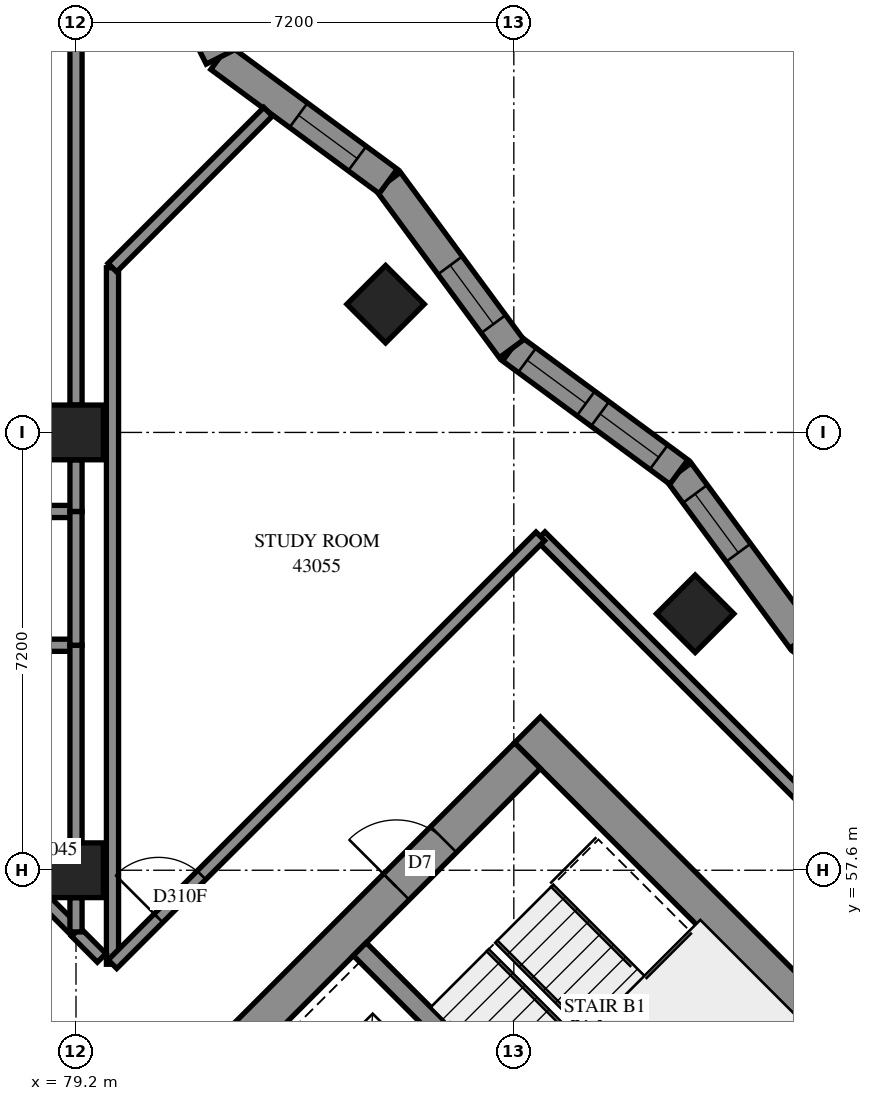
"""IFC4 building model, lengths in metres.
Left out: names, types, materials, properties, quantities, classifications, styles, units other than length and angle.
Written with IfcOpenShell. Run it as: python <this file> out.ifc"""

import sys

from ifc_helpers import new_model, si_unit, direction, frame, frame_2d, origin, origin_2d, place, context, subcontext, project, spatial, polyline, rectangle, outline, extrude, element, fill, save


model = new_model("IFC4")
c1 = context("Model", 3, precision=1e-05, world=origin(), true_north=direction((0.0, 1.0)))
c2 = subcontext(c1, "Body", "Model", "MODEL_VIEW")
j1 = project(units=[si_unit("LENGTHUNIT", "METRE"), si_unit("PLANEANGLEUNIT", "RADIAN")], contexts=[c1])
p1 = place(None, origin())
s1 = spatial("IfcSite", under=j1, at=p1, CompositionType="ELEMENT")
p2 = place(p1, origin())
s2 = spatial("IfcBuilding", under=s1, at=p2, CompositionType="ELEMENT")
p3 = place(p2, frame((0.0, 0.0, 159.2)))
s3 = spatial("IfcBuildingStorey", under=s2, at=p3, CompositionType="ELEMENT", Elevation=159.2)
for number, where, z_axis, x_axis in (
    (1, (79.2, 57.6, 0.0), (0.0, 0.0, 1.0), (1.0, 0.0, 0.0)),
    (2, (79.2, 64.8, 0.0), (0.0, 0.0, 1.0), (1.0, 0.0, 0.0)),
    (3, (84.291, 66.909, 0.0), (0.0, 0.0, 1.0), (0.707, -0.707, 0.0)),
    (4, (89.382, 61.818, 0.0), (0.0, 0.0, 1.0), (0.707, -0.707, 0.0)),
):
    element("IfcColumn", number, at=place(p3, frame(where, z_axis=z_axis, x_axis=x_axis)), inside=s3, PredefinedType="COLUMN", context=c2, shape_type="SweptSolid", body=[
        extrude(rectangle(XDim=0.9, YDim=0.9, at=origin_2d()), origin(), (0.0, 0.0, 1.0), 3.1),
    ])
p4 = place(p3, frame((86.625, 59.908, -0.3), z_axis=(0.0, 0.0, 1.0), x_axis=(0.7071067812, -0.7071067812, 0.0)))
e5 = element("IfcWall", 5, at=p4, inside=s3, PredefinedType="SHEAR", context=c2, shape_type="SweptSolid", body=[
    extrude(rectangle(XDim=15.6, YDim=0.6, at=frame_2d((7.8, 0.0))), origin(), (0.0, 0.0, 1.0), 2.7),
])
p5 = place(p4, frame((10.6, 0.0, 0.3)))
e6 = element("IfcOpeningElement", 6, at=p5, cuts=e5, PredefinedType="OPENING", context=c2, shape_type="SweptSolid", body=[
    extrude(rectangle(XDim=0.8, YDim=2.1, at=frame_2d((0.4, 1.05))), frame((0.0, 0.31, 0.0), z_axis=(0.0, -1.0, 0.0), x_axis=(1.0, 0.0, 0.0)), (0.0, 0.0, 1.0), 0.62),
])
p6 = place(p3, frame((76.442, 49.302, -0.3), z_axis=(0.0, 0.0, 1.0), x_axis=(0.7071067812, 0.7071067812, 0.0)))
e7 = element("IfcWall", 7, at=p6, inside=s3, PredefinedType="SHEAR", context=c2, shape_type="SweptSolid", body=[
    extrude(rectangle(XDim=14.4, YDim=0.6, at=frame_2d((7.2, 0.0))), origin(), (0.0, 0.0, 1.0), 2.7),
])
p7 = place(p6, frame((4.55, 0.0, 0.3)))
e8 = element("IfcOpeningElement", 8, at=p7, cuts=e7, PredefinedType="OPENING", context=c2, shape_type="SweptSolid", body=[
    extrude(rectangle(XDim=1.1, YDim=2.1, at=frame_2d((0.55, 1.05))), frame((0.0, 0.31, 0.0), z_axis=(0.0, -1.0, 0.0), x_axis=(1.0, 0.0, 0.0)), (0.0, 0.0, 1.0), 0.62),
])
p8 = place(p6, frame((11.35, 0.0, 0.3)))
e9 = element("IfcOpeningElement", 9, at=p8, cuts=e7, PredefinedType="OPENING", context=c2, shape_type="SweptSolid", body=[
    extrude(rectangle(XDim=1.1, YDim=2.1, at=frame_2d((0.55, 1.05))), frame((0.0, 0.31, 0.0), z_axis=(0.0, -1.0, 0.0), x_axis=(1.0, 0.0, 0.0)), (0.0, 0.0, 1.0), 0.62),
])
p9 = place(p3, frame((83.867, 56.302, 0.0), z_axis=(0.0, 0.0, 1.0), x_axis=(0.7071137256, -0.7070998367, 0.0)))
e10 = element("IfcWall", 10, at=p9, inside=s3, PredefinedType="SOLIDWALL", context=c2, shape_type="SweptSolid", body=[
    extrude(rectangle(XDim=7.2, YDim=0.3, at=frame_2d((3.6, 0.0))), origin(), (0.0, 0.0, 1.0), 3.1),
])
p10 = place(p3, frame((93.894, 59.37, 0.0), z_axis=(0.0, 0.0, 1.0), x_axis=(-0.8050403966, 0.5932199928, 0.0)))
e11 = element("IfcWall", 11, at=p10, inside=s3, PredefinedType="SOLIDWALL", context=c2, shape_type="SweptSolid", body=[
    extrude(outline(polyline([(-0.038, -0.25), (3.381, -0.25), (3.456, 0.25), (0.038, 0.25), (-0.038, -0.25)])), origin(), (0.0, 0.0, 1.0), 3.1),
])
p11 = place(p10, frame((1.677, 0.0, 0.45)))
e12 = element("IfcOpeningElement", 12, at=p11, cuts=e11, PredefinedType="OPENING", context=c2, shape_type="SweptSolid", body=[
    extrude(rectangle(XDim=1.2, YDim=2.5, at=frame_2d((0.6, 1.25))), frame((0.0, 0.26, 0.0), z_axis=(0.0, -1.0, 0.0), x_axis=(1.0, 0.0, 0.0)), (0.0, 0.0, 1.0), 0.52),
])
p12 = place(p3, frame((91.142, 61.398, 0.0), z_axis=(0.0, 0.0, 1.0), x_axis=(-0.5932150043, 0.8050440725, 0.0)))
e13 = element("IfcWall", 13, at=p12, inside=s3, PredefinedType="SOLIDWALL", context=c2, shape_type="SweptSolid", body=[
    extrude(outline(polyline([(0.038, -0.25), (3.456, -0.25), (3.381, 0.25), (-0.038, 0.25), (0.038, -0.25)])), origin(), (0.0, 0.0, 1.0), 3.1),
])
p13 = place(p12, frame((1.77, 0.0, 0.45)))
e14 = element("IfcOpeningElement", 14, at=p13, cuts=e13, PredefinedType="OPENING", context=c2, shape_type="SweptSolid", body=[
    extrude(rectangle(XDim=1.2, YDim=2.5, at=frame_2d((0.6, 1.25))), frame((0.0, 0.26, 0.0), z_axis=(0.0, -1.0, 0.0), x_axis=(1.0, 0.0, 0.0)), (0.0, 0.0, 1.0), 0.52),
])
p14 = place(p3, frame((89.114, 64.149, 0.0), z_axis=(0.0, 0.0, 1.0), x_axis=(-0.8050301018, 0.5932339633, 0.0)))
e15 = element("IfcWall", 15, at=p14, inside=s3, PredefinedType="SOLIDWALL", context=c2, shape_type="SweptSolid", body=[
    extrude(outline(polyline([(-0.038, -0.25), (3.381, -0.25), (3.456, 0.25), (0.038, 0.25), (-0.038, -0.25)])), origin(), (0.0, 0.0, 1.0), 3.1),
])
p15 = place(p14, frame((0.41, 0.0, 0.45)))
e16 = element("IfcOpeningElement", 16, at=p15, cuts=e15, PredefinedType="OPENING", context=c2, shape_type="SweptSolid", body=[
    extrude(rectangle(XDim=1.2, YDim=2.5, at=frame_2d((0.6, 1.25))), frame((0.0, 0.26, 0.0), z_axis=(0.0, -1.0, 0.0), x_axis=(1.0, 0.0, 0.0)), (0.0, 0.0, 1.0), 0.52),
])
p16 = place(p14, frame((1.9, 0.0, 0.45)))
e17 = element("IfcOpeningElement", 17, at=p16, cuts=e15, PredefinedType="OPENING", context=c2, shape_type="SweptSolid", body=[
    extrude(rectangle(XDim=1.2, YDim=2.5, at=frame_2d((0.6, 1.25))), frame((0.0, 0.26, 0.0), z_axis=(0.0, -1.0, 0.0), x_axis=(1.0, 0.0, 0.0)), (0.0, 0.0, 1.0), 0.52),
])
p17 = place(p3, frame((86.362, 66.177, 0.0), z_axis=(0.0, 0.0, 1.0), x_axis=(-0.5932339633, 0.8050301018, 0.0)))
e18 = element("IfcWall", 18, at=p17, inside=s3, PredefinedType="SOLIDWALL", context=c2, shape_type="SweptSolid", body=[
    extrude(outline(polyline([(0.038, -0.25), (3.456, -0.25), (3.381, 0.25), (-0.038, 0.25), (0.038, -0.25)])), origin(), (0.0, 0.0, 1.0), 3.1),
])
p18 = place(p17, frame((0.502, 0.0, 0.45)))
e19 = element("IfcOpeningElement", 19, at=p18, cuts=e18, PredefinedType="OPENING", context=c2, shape_type="SweptSolid", body=[
    extrude(rectangle(XDim=1.2, YDim=2.5, at=frame_2d((0.6, 1.25))), frame((0.0, 0.26, 0.0), z_axis=(0.0, -1.0, 0.0), x_axis=(1.0, 0.0, 0.0)), (0.0, 0.0, 1.0), 0.52),
])
p19 = place(p3, frame((84.334, 68.929, 0.0), z_axis=(0.0, 0.0, 1.0), x_axis=(-0.8050434162, 0.5932158949, 0.0)))
e20 = element("IfcWall", 20, at=p19, inside=s3, PredefinedType="SOLIDWALL", context=c2, shape_type="SweptSolid", body=[
    extrude(outline(polyline([(-0.038, -0.25), (3.381, -0.25), (3.5, 0.25), (0.038, 0.25), (-0.038, -0.25)])), origin(), (0.0, 0.0, 1.0), 3.1),
])
p20 = place(p19, frame((0.632, 0.0, 0.45)))
e21 = element("IfcOpeningElement", 21, at=p20, cuts=e20, PredefinedType="OPENING", context=c2, shape_type="SweptSolid", body=[
    extrude(rectangle(XDim=1.2, YDim=2.5, at=frame_2d((0.6, 1.25))), frame((0.0, 0.26, 0.0), z_axis=(0.0, -1.0, 0.0), x_axis=(1.0, 0.0, 0.0)), (0.0, 0.0, 1.0), 0.52),
])
p21 = place(p3, frame((81.565, 70.97, 0.0), z_axis=(0.0, 0.0, 1.0), x_axis=(-0.4506826549, 0.8926842357, 0.0)))
e22 = element("IfcWall", 22, at=p21, inside=s3, PredefinedType="SOLIDWALL", context=c2, shape_type="SweptSolid", body=[
    extrude(outline(polyline([(0.06, -0.25), (3.618, -0.25), (3.202, 0.25), (-0.06, 0.25), (0.06, -0.25)])), origin(), (0.0, 0.0, 1.0), 3.1),
])
p22 = place(p21, frame((0.764, 0.0, 0.45)))
e23 = element("IfcOpeningElement", 23, at=p22, cuts=e22, PredefinedType="OPENING", context=c2, shape_type="SweptSolid", body=[
    extrude(rectangle(XDim=1.2, YDim=2.5, at=frame_2d((0.6, 1.25))), frame((0.0, 0.26, 0.0), z_axis=(0.0, -1.0, 0.0), x_axis=(1.0, 0.0, 0.0)), (0.0, 0.0, 1.0), 0.52),
])
p23 = place(p3, frame((86.841, 63.093, 0.0), z_axis=(0.0, 0.0, 1.0), x_axis=(0.7071067812, -0.7071067812, 0.0)))
e24 = element("IfcWall", 24, at=p23, inside=s3, PredefinedType="PARTITIONING", context=c2, shape_type="SweptSolid", body=[
    extrude(rectangle(XDim=12.239, YDim=0.2, at=frame_2d((6.119, 0.0))), origin(), (0.0, 0.0, 1.0), 3.1),
])
p24 = place(p23, frame((10.634, 0.0, 0.0)))
e25 = element("IfcOpeningElement", 25, at=p24, cuts=e24, PredefinedType="OPENING", context=c2, shape_type="SweptSolid", body=[
    extrude(rectangle(XDim=0.9, YDim=2.1, at=frame_2d((0.45, 1.05))), frame((0.0, 0.11, 0.0), z_axis=(0.0, -1.0, 0.0), x_axis=(1.0, 0.0, 0.0)), (0.0, 0.0, 1.0), 0.22),
])
p25 = place(p3, frame((79.8, 56.054, 0.0), z_axis=(0.0, 0.0, 1.0), x_axis=(0.0, 1.0, 0.0)))
e26 = element("IfcWall", 26, at=p25, inside=s3, PredefinedType="PARTITIONING", context=c2, shape_type="SweptSolid", body=[
    extrude(rectangle(XDim=11.454, YDim=0.2, at=frame_2d((5.727, 0.0))), origin(), (0.0, 0.0, 1.0), 3.1),
])
p26 = place(p3, frame((79.799, 56.055, 0.0), z_axis=(0.0, 0.0, 1.0), x_axis=(0.7071067812, 0.7071067812, 0.0)))
e27 = element("IfcWall", 27, at=p26, inside=s3, PredefinedType="PARTITIONING", context=c2, shape_type="SweptSolid", body=[
    extrude(rectangle(XDim=9.95, YDim=0.2, at=frame_2d((4.975, 0.0))), origin(), (0.0, 0.0, 1.0), 3.1),
])
p27 = place(p26, frame((1.071, 0.0, 0.0)))
e28 = element("IfcOpeningElement", 28, at=p27, cuts=e27, PredefinedType="OPENING", context=c2, shape_type="SweptSolid", body=[
    extrude(rectangle(XDim=1.0, YDim=2.1, at=frame_2d((0.5, 1.05))), frame((0.0, 0.11, 0.0), z_axis=(0.0, -1.0, 0.0), x_axis=(1.0, 0.0, 0.0)), (0.0, 0.0, 1.0), 0.22),
])
p28 = place(p3, frame((79.2, 65.25, 0.0), z_axis=(0.0, 0.0, 1.0), x_axis=(0.0, 1.0, 0.0)))
e29 = element("IfcWall", 29, at=p28, inside=s3, PredefinedType="PARTITIONING", context=c2, shape_type="SweptSolid", body=[
    extrude(rectangle(XDim=6.3, YDim=0.2, at=frame_2d((3.15, 0.0))), origin(), (0.0, 0.0, 1.0), 3.1),
])
p29 = place(p3, frame((74.903, 60.889, 0.0), z_axis=(0.0, 0.0, 1.0), x_axis=(0.7071067812, -0.7071067812, 0.0)))
e30 = element("IfcWall", 30, at=p29, inside=s3, PredefinedType="PARTITIONING", context=c2, shape_type="SweptSolid", body=[
    extrude(rectangle(XDim=6.081, YDim=0.2, at=frame_2d((3.041, 0.0))), origin(), (0.0, 0.0, 1.0), 3.1),
])
p30 = place(p3, frame((74.488, 61.3, 0.0), z_axis=(0.0, 0.0, 1.0), x_axis=(1.0, 0.0, 0.0)))
e31 = element("IfcWall", 31, at=p30, inside=s3, PredefinedType="PARTITIONING", context=c2, shape_type="SweptSolid", body=[
    extrude(rectangle(XDim=4.712, YDim=0.2, at=frame_2d((2.356, 0.0))), origin(), (0.0, 0.0, 1.0), 3.1),
])
p31 = place(p30, frame((1.037, 0.0, 0.0)))
e32 = element("IfcOpeningElement", 32, at=p31, cuts=e31, PredefinedType="OPENING", context=c2, shape_type="SweptSolid", body=[
    extrude(rectangle(XDim=1.0, YDim=2.1, at=frame_2d((0.5, 1.05))), frame((0.0, 0.11, 0.0), z_axis=(0.0, -1.0, 0.0), x_axis=(1.0, 0.0, 0.0)), (0.0, 0.0, 1.0), 0.22),
])
p32 = place(p3, frame((74.702, 63.5, 0.0), z_axis=(0.0, 0.0, 1.0), x_axis=(1.0, 0.0, 0.0)))
e33 = element("IfcWall", 33, at=p32, inside=s3, PredefinedType="PARTITIONING", context=c2, shape_type="SweptSolid", body=[
    extrude(rectangle(XDim=4.498, YDim=0.2, at=frame_2d((2.249, 0.0))), origin(), (0.0, 0.0, 1.0), 3.1),
])
p33 = place(p32, frame((3.046, 0.0, 0.0)))
e34 = element("IfcOpeningElement", 34, at=p33, cuts=e33, PredefinedType="OPENING", context=c2, shape_type="SweptSolid", body=[
    extrude(rectangle(XDim=0.9, YDim=2.1, at=frame_2d((0.45, 1.05))), frame((0.0, 0.11, 0.0), z_axis=(0.0, -1.0, 0.0), x_axis=(1.0, 0.0, 0.0)), (0.0, 0.0, 1.0), 0.22),
])
p34 = place(p3, frame((79.798, 67.51, 0.0), z_axis=(0.0, 0.0, 1.0), x_axis=(0.7068308048, 0.7073826499, 0.0)))
e35 = element("IfcWall", 35, at=p34, inside=s3, PredefinedType="PARTITIONING", context=c2, shape_type="SweptSolid", body=[
    extrude(rectangle(XDim=3.624, YDim=0.2, at=frame_2d((1.812, 0.0))), origin(), (0.0, 0.0, 1.0), 3.1),
])
p35 = place(p3, frame((79.2, 58.05, 0.0), z_axis=(0.0, 0.0, 1.0), x_axis=(0.0, 1.0, 0.0)))
e36 = element("IfcWall", 36, at=p35, inside=s3, PredefinedType="PARTITIONING", context=c2, shape_type="SweptSolid", body=[
    extrude(rectangle(XDim=3.25, YDim=0.2, at=frame_2d((1.625, 0.0))), origin(), (0.0, 0.0, 1.0), 3.1),
])
p36 = place(p3, frame((79.2, 61.3, 0.0), z_axis=(0.0, 0.0, 1.0), x_axis=(0.0, 1.0, 0.0)))
e37 = element("IfcWall", 37, at=p36, inside=s3, PredefinedType="PARTITIONING", context=c2, shape_type="SweptSolid", body=[
    extrude(rectangle(XDim=2.2, YDim=0.2, at=frame_2d((1.1, 0.0))), origin(), (0.0, 0.0, 1.0), 3.1),
])
p37 = place(p3, frame((79.2, 63.5, 0.0), z_axis=(0.0, 0.0, 1.0), x_axis=(0.0, 1.0, 0.0)))
e38 = element("IfcWall", 38, at=p37, inside=s3, PredefinedType="PARTITIONING", context=c2, shape_type="SweptSolid", body=[
    extrude(rectangle(XDim=0.85, YDim=0.2, at=frame_2d((0.425, 0.0))), origin(), (0.0, 0.0, 1.0), 3.1),
])
p38 = place(p3, frame((79.198, 56.584, 0.0), z_axis=(0.0, 0.0, 1.0), x_axis=(0.7054410477, -0.7087685999, 0.0)))
e39 = element("IfcWall", 39, at=p38, inside=s3, PredefinedType="PARTITIONING", context=c2, shape_type="SweptSolid", body=[
    extrude(rectangle(XDim=0.601, YDim=0.2, at=frame_2d((0.3, 0.0))), origin(), (0.0, 0.0, 1.0), 3.1),
])
p39 = place(p3, frame((79.2, 56.586, 0.0), z_axis=(0.0, 0.0, 1.0), x_axis=(0.0, 1.0, 0.0)))
e40 = element("IfcWall", 40, at=p39, inside=s3, PredefinedType="PARTITIONING", context=c2, shape_type="SweptSolid", body=[
    extrude(rectangle(XDim=0.564, YDim=0.2, at=frame_2d((0.282, 0.0))), origin(), (0.0, 0.0, 1.0), 3.1),
])
p40 = place(p13, origin())
e41 = element("IfcWindow", 41, at=p40, inside=s3, PartitioningType="SINGLE_PANEL", PredefinedType="WINDOW", context=c2, shape_type="SweptSolid", body=[
    extrude(rectangle(XDim=1.2, YDim=2.5, at=frame_2d((0.6, 1.25))), frame((0.0, 0.18, 0.0), z_axis=(0.0, -1.0, 0.0), x_axis=(1.0, 0.0, 0.0)), (0.0, 0.0, 1.0), 0.06),
])
fill(e14, e41)
p41 = place(p15, origin())
e42 = element("IfcWindow", 42, at=p41, inside=s3, PartitioningType="SINGLE_PANEL", PredefinedType="WINDOW", context=c2, shape_type="SweptSolid", body=[
    extrude(rectangle(XDim=1.2, YDim=2.5, at=frame_2d((0.6, 1.25))), frame((0.0, 0.18, 0.0), z_axis=(0.0, -1.0, 0.0), x_axis=(1.0, 0.0, 0.0)), (0.0, 0.0, 1.0), 0.06),
])
fill(e16, e42)
p42 = place(p16, origin())
e43 = element("IfcWindow", 43, at=p42, inside=s3, PartitioningType="SINGLE_PANEL", PredefinedType="WINDOW", context=c2, shape_type="SweptSolid", body=[
    extrude(rectangle(XDim=1.2, YDim=2.5, at=frame_2d((0.6, 1.25))), frame((0.0, 0.18, 0.0), z_axis=(0.0, -1.0, 0.0), x_axis=(1.0, 0.0, 0.0)), (0.0, 0.0, 1.0), 0.06),
])
fill(e17, e43)
p43 = place(p18, origin())
e44 = element("IfcWindow", 44, at=p43, inside=s3, PartitioningType="SINGLE_PANEL", PredefinedType="WINDOW", context=c2, shape_type="SweptSolid", body=[
    extrude(rectangle(XDim=1.2, YDim=2.5, at=frame_2d((0.6, 1.25))), frame((0.0, 0.18, 0.0), z_axis=(0.0, -1.0, 0.0), x_axis=(1.0, 0.0, 0.0)), (0.0, 0.0, 1.0), 0.06),
])
fill(e19, e44)
p44 = place(p20, origin())
e45 = element("IfcWindow", 45, at=p44, inside=s3, PartitioningType="SINGLE_PANEL", PredefinedType="WINDOW", context=c2, shape_type="SweptSolid", body=[
    extrude(rectangle(XDim=1.2, YDim=2.5, at=frame_2d((0.6, 1.25))), frame((0.0, 0.18, 0.0), z_axis=(0.0, -1.0, 0.0), x_axis=(1.0, 0.0, 0.0)), (0.0, 0.0, 1.0), 0.06),
])
fill(e21, e45)
p45 = place(p8, origin())
e46 = element("IfcDoor", 46, at=p45, inside=s3, OperationType="SINGLE_SWING_LEFT", PredefinedType="DOOR", context=c2, shape_type="SweptSolid", body=[
    extrude(rectangle(XDim=1.1, YDim=2.1, at=frame_2d((0.55, 1.05))), frame((0.0, 0.025, 0.0), z_axis=(0.0, -1.0, 0.0), x_axis=(1.0, 0.0, 0.0)), (0.0, 0.0, 1.0), 0.05),
])
fill(e9, e46)
p46 = place(p27, origin())
e47 = element("IfcDoor", 47, at=p46, inside=s3, OperationType="SINGLE_SWING_RIGHT", PredefinedType="DOOR", context=c2, shape_type="SweptSolid", body=[
    extrude(rectangle(XDim=1.0, YDim=2.1, at=frame_2d((0.5, 1.05))), frame((0.0, 0.025, 0.0), z_axis=(0.0, -1.0, 0.0), x_axis=(1.0, 0.0, 0.0)), (0.0, 0.0, 1.0), 0.05),
])
fill(e28, e47)
save(model, sys.argv[1])
